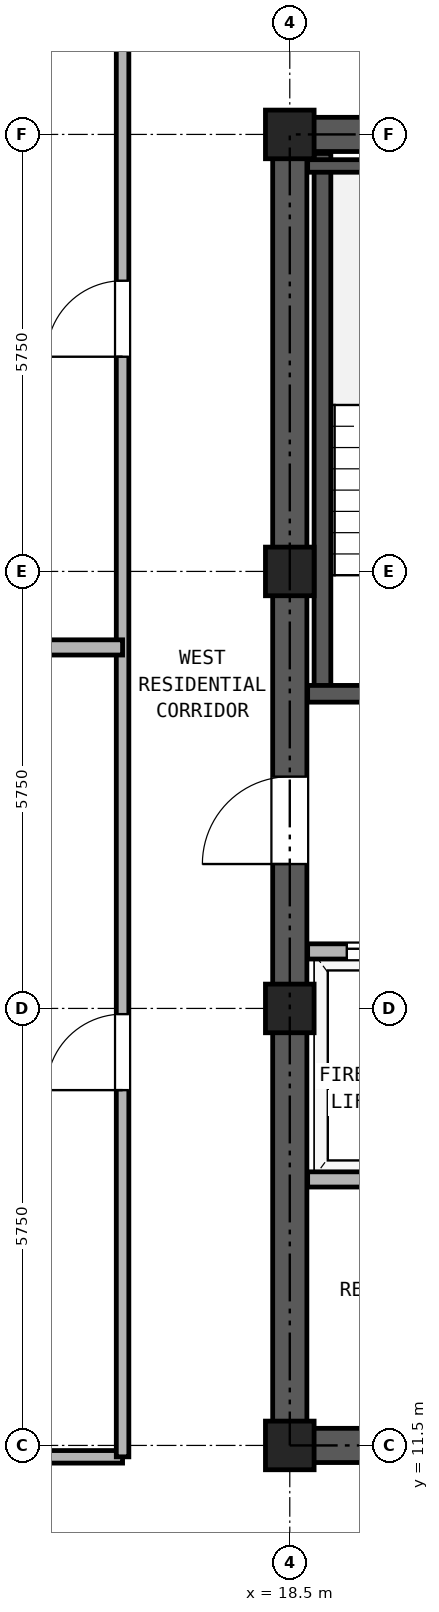
"""IFC4 building model, lengths in metres.
Left out: names, types, materials, properties, quantities, classifications, styles, units other than length and angle.
Written with IfcOpenShell. Run it as: python <this file> out.ifc"""

import sys

from ifc_helpers import new_model, si_unit, direction, frame, frame_2d, origin, origin_2d, place, context, subcontext, project, spatial, rectangle, hollow_rectangle, extrude, source, transform, mapped, element, fill, save


model = new_model("IFC4")
c1 = context("Model", 3, precision=1e-05, world=origin(), true_north=direction((0.0, 1.0)))
c2 = subcontext(c1, "Body", "Model", "MODEL_VIEW")
j1 = project(units=[si_unit("LENGTHUNIT", "METRE"), si_unit("PLANEANGLEUNIT", "RADIAN")], contexts=[c1])
p1 = place(None, origin())
s1 = spatial("IfcSite", under=j1, at=p1, CompositionType="ELEMENT")
p2 = place(p1, origin())
s2 = spatial("IfcBuilding", under=s1, at=p2, CompositionType="ELEMENT")
p3 = place(p2, frame((0.0, 0.0, 206.0)))
s3 = spatial("IfcBuildingStorey", under=s2, at=p3, CompositionType="ELEMENT", Elevation=206.0)
m1 = source(origin(), c2, "Body", "SweptSolid", [
    extrude(hollow_rectangle(XDim=0.64, YDim=0.64, WallThickness=0.035, at=origin_2d()), origin(), (0.0, 0.0, 1.0), 2.95),
])
for number, where, z_axis, x_axis in (
    (1, (18.5, 11.5, 0.0), (0.0, 0.0, 1.0), (1.0, 0.0, 0.0)),
    (2, (18.5, 17.25, 0.0), (0.0, 0.0, 1.0), (1.0, 0.0, 0.0)),
    (3, (18.5, 23.0, 0.0), (0.0, 0.0, 1.0), (1.0, 0.0, 0.0)),
    (4, (18.5, 28.75, 0.0), (0.0, 0.0, 1.0), (1.0, 0.0, 0.0)),
):
    element("IfcColumn", number, at=place(p3, frame(where, z_axis=z_axis, x_axis=x_axis)), inside=s3, PredefinedType="COLUMN", context=c2, shape_type="MappedRepresentation", body=[
        mapped(m1, transform((0.0, 0.0, 0.0), x_axis=(1.0, 0.0, 0.0), y_axis=(0.0, 1.0, 0.0), z_axis=(0.0, 0.0, 1.0), scale=1.0)),
    ])
p4 = place(p3, frame((18.275, 11.5, 0.0), z_axis=(0.0, 0.0, 1.0), x_axis=(1.0, 0.0, 0.0)))
e5 = element("IfcWall", 5, at=p4, inside=s3, PredefinedType="SHEAR", context=c2, shape_type="SweptSolid", body=[
    extrude(rectangle(XDim=10.45, YDim=0.45, at=frame_2d((5.225, 0.0))), origin(), (0.0, 0.0, 1.0), 2.95),
])
p5 = place(p4, frame((1.825, 0.0, 0.0)))
e6 = element("IfcOpeningElement", 6, at=p5, cuts=e5, PredefinedType="OPENING", context=c2, shape_type="SweptSolid", body=[
    extrude(rectangle(XDim=0.95, YDim=2.15, at=frame_2d((0.475, 1.075))), frame((0.0, 0.235, 0.0), z_axis=(0.0, -1.0, 0.0), x_axis=(1.0, 0.0, 0.0)), (0.0, 0.0, 1.0), 0.47),
])
p6 = place(p4, frame((5.325, 0.0, 0.0)))
e7 = element("IfcOpeningElement", 7, at=p6, cuts=e5, PredefinedType="OPENING", context=c2, shape_type="SweptSolid", body=[
    extrude(rectangle(XDim=0.95, YDim=2.15, at=frame_2d((0.475, 1.075))), frame((0.0, 0.235, 0.0), z_axis=(0.0, -1.0, 0.0), x_axis=(1.0, 0.0, 0.0)), (0.0, 0.0, 1.0), 0.47),
])
p7 = place(p4, frame((8.225, 0.0, 0.0)))
e8 = element("IfcOpeningElement", 8, at=p7, cuts=e5, PredefinedType="OPENING", context=c2, shape_type="SweptSolid", body=[
    extrude(rectangle(XDim=1.1, YDim=2.25, at=frame_2d((0.55, 1.125))), frame((0.0, 0.235, 0.0), z_axis=(0.0, -1.0, 0.0), x_axis=(1.0, 0.0, 0.0)), (0.0, 0.0, 1.0), 0.47),
])
p8 = place(p3, frame((18.275, 28.75, 0.0), z_axis=(0.0, 0.0, 1.0), x_axis=(1.0, 0.0, 0.0)))
e9 = element("IfcWall", 9, at=p8, inside=s3, PredefinedType="SHEAR", context=c2, shape_type="SweptSolid", body=[
    extrude(rectangle(XDim=10.45, YDim=0.45, at=frame_2d((5.225, 0.0))), origin(), (0.0, 0.0, 1.0), 2.95),
])
p9 = place(p8, frame((4.105, 0.0, 0.0)))
e10 = element("IfcOpeningElement", 10, at=p9, cuts=e9, PredefinedType="OPENING", context=c2, shape_type="SweptSolid", body=[
    extrude(rectangle(XDim=0.9, YDim=2.05, at=frame_2d((0.45, 1.025))), frame((0.0, 0.235, 0.0), z_axis=(0.0, -1.0, 0.0), x_axis=(1.0, 0.0, 0.0)), (0.0, 0.0, 1.0), 0.47),
])
p10 = place(p8, frame((5.645, 0.0, 0.0)))
e11 = element("IfcOpeningElement", 11, at=p10, cuts=e9, PredefinedType="OPENING", context=c2, shape_type="SweptSolid", body=[
    extrude(rectangle(XDim=0.9, YDim=2.05, at=frame_2d((0.45, 1.025))), frame((0.0, 0.235, 0.0), z_axis=(0.0, -1.0, 0.0), x_axis=(1.0, 0.0, 0.0)), (0.0, 0.0, 1.0), 0.47),
])
p11 = place(p3, frame((18.5, 11.725, 0.0), z_axis=(0.0, 0.0, 1.0), x_axis=(0.0, 1.0, 0.0)))
e12 = element("IfcWall", 12, at=p11, inside=s3, PredefinedType="SHEAR", context=c2, shape_type="SweptSolid", body=[
    extrude(rectangle(XDim=16.8, YDim=0.45, at=frame_2d((8.4, 0.0))), origin(), (0.0, 0.0, 1.0), 2.95),
])
p12 = place(p11, frame((7.425, 0.0, 0.0)))
e13 = element("IfcOpeningElement", 13, at=p12, cuts=e12, PredefinedType="OPENING", context=c2, shape_type="SweptSolid", body=[
    extrude(rectangle(XDim=1.15, YDim=2.2, at=frame_2d((0.575, 1.1))), frame((0.0, 0.235, 0.0), z_axis=(0.0, -1.0, 0.0), x_axis=(1.0, 0.0, 0.0)), (0.0, 0.0, 1.0), 0.47),
])
p13 = place(p3, frame((18.93, 21.39, 0.0), z_axis=(0.0, 0.0, 1.0), x_axis=(0.0, 1.0, 0.0)))
e14 = element("IfcWall", 14, at=p13, inside=s3, PredefinedType="SOLIDWALL", context=c2, shape_type="SweptSolid", body=[
    extrude(rectangle(XDim=7.11, YDim=0.22, at=frame_2d((3.555, 0.0))), origin(), (0.0, 0.0, 1.0), 2.95),
])
p14 = place(p3, frame((18.735, 28.335, 0.0), z_axis=(0.0, 0.0, 1.0), x_axis=(1.0, 0.0, 0.0)))
e15 = element("IfcWall", 15, at=p14, inside=s3, PredefinedType="PARTITIONING", context=c2, shape_type="SweptSolid", body=[
    extrude(rectangle(XDim=3.375, YDim=0.165, at=frame_2d((1.688, 0.0))), origin(), (0.0, 0.0, 1.0), 2.95),
])
p15 = place(p3, frame((18.735, 21.39, 0.0), z_axis=(0.0, 0.0, 1.0), x_axis=(1.0, 0.0, 0.0)))
e16 = element("IfcWall", 16, at=p15, inside=s3, PredefinedType="SOLIDWALL", context=c2, shape_type="SweptSolid", body=[
    extrude(rectangle(XDim=6.395, YDim=0.22, at=frame_2d((3.197, 0.0))), origin(), (0.0, 0.0, 1.0), 2.95),
])
p16 = place(p15, frame((1.115, 0.0, 0.0)))
e17 = element("IfcOpeningElement", 17, at=p16, cuts=e16, PredefinedType="OPENING", context=c2, shape_type="SweptSolid", body=[
    extrude(rectangle(XDim=1.15, YDim=2.2, at=frame_2d((0.575, 1.1))), frame((0.0, 0.12, 0.0), z_axis=(0.0, -1.0, 0.0), x_axis=(1.0, 0.0, 0.0)), (0.0, 0.0, 1.0), 0.24),
])
p17 = place(p15, frame((4.845, 0.0, 0.0)))
e18 = element("IfcOpeningElement", 18, at=p17, cuts=e16, PredefinedType="OPENING", context=c2, shape_type="SweptSolid", body=[
    extrude(rectangle(XDim=1.1, YDim=2.25, at=frame_2d((0.55, 1.125))), frame((0.0, 0.12, 0.0), z_axis=(0.0, -1.0, 0.0), x_axis=(1.0, 0.0, 0.0)), (0.0, 0.0, 1.0), 0.24),
])
p18 = place(p3, frame((18.735, 18.0, 0.0), z_axis=(0.0, 0.0, 1.0), x_axis=(1.0, 0.0, 0.0)))
e19 = element("IfcWall", 19, at=p18, inside=s3, PredefinedType="PARTITIONING", context=c2, shape_type="SweptSolid", body=[
    extrude(rectangle(XDim=9.53, YDim=0.2, at=frame_2d((4.765, 0.0))), origin(), (0.0, 0.0, 1.0), 2.95),
])
p19 = place(p18, frame((0.515, 0.0, 0.0)))
e20 = element("IfcOpeningElement", 20, at=p19, cuts=e19, PredefinedType="OPENING", context=c2, shape_type="SweptSolid", body=[
    extrude(rectangle(XDim=1.3, YDim=2.3, at=frame_2d((0.65, 1.15))), frame((0.0, 0.11, 0.0), z_axis=(0.0, -1.0, 0.0), x_axis=(1.0, 0.0, 0.0)), (0.0, 0.0, 1.0), 0.22),
])
p20 = place(p18, frame((2.615, 0.0, 0.0)))
e21 = element("IfcOpeningElement", 21, at=p20, cuts=e19, PredefinedType="OPENING", context=c2, shape_type="SweptSolid", body=[
    extrude(rectangle(XDim=1.3, YDim=2.3, at=frame_2d((0.65, 1.15))), frame((0.0, 0.11, 0.0), z_axis=(0.0, -1.0, 0.0), x_axis=(1.0, 0.0, 0.0)), (0.0, 0.0, 1.0), 0.22),
])
p21 = place(p18, frame((5.015, 0.0, 0.0)))
e22 = element("IfcOpeningElement", 22, at=p21, cuts=e19, PredefinedType="OPENING", context=c2, shape_type="SweptSolid", body=[
    extrude(rectangle(XDim=0.9, YDim=2.05, at=frame_2d((0.45, 1.025))), frame((0.0, 0.11, 0.0), z_axis=(0.0, -1.0, 0.0), x_axis=(1.0, 0.0, 0.0)), (0.0, 0.0, 1.0), 0.22),
])
p22 = place(p18, frame((7.715, 0.0, 0.0)))
e23 = element("IfcOpeningElement", 23, at=p22, cuts=e19, PredefinedType="OPENING", context=c2, shape_type="SweptSolid", body=[
    extrude(rectangle(XDim=0.9, YDim=2.05, at=frame_2d((0.45, 1.025))), frame((0.0, 0.11, 0.0), z_axis=(0.0, -1.0, 0.0), x_axis=(1.0, 0.0, 0.0)), (0.0, 0.0, 1.0), 0.22),
])
p23 = place(p3, frame((18.735, 15.0, 0.0), z_axis=(0.0, 0.0, 1.0), x_axis=(1.0, 0.0, 0.0)))
e24 = element("IfcWall", 24, at=p23, inside=s3, PredefinedType="PARTITIONING", context=c2, shape_type="SweptSolid", body=[
    extrude(rectangle(XDim=9.53, YDim=0.2, at=frame_2d((4.765, 0.0))), origin(), (0.0, 0.0, 1.0), 2.95),
])
p24 = place(p3, frame((7.6, 11.35, 0.0), z_axis=(0.0, 0.0, 1.0), x_axis=(1.0, 0.0, 0.0)))
e25 = element("IfcWall", 25, at=p24, inside=s3, PredefinedType="PARTITIONING", context=c2, shape_type="SweptSolid", body=[
    extrude(rectangle(XDim=8.7, YDim=0.165, at=frame_2d((4.35, 0.0))), origin(), (0.0, 0.0, 1.0), 2.323),
])
p25 = place(p3, frame((16.3, 11.35, 0.0), z_axis=(0.0, 0.0, 1.0), x_axis=(0.0, 1.0, 0.0)))
e26 = element("IfcWall", 26, at=p25, inside=s3, PredefinedType="PARTITIONING", context=c2, shape_type="SweptSolid", body=[
    extrude(rectangle(XDim=23.79, YDim=0.165, at=frame_2d((11.895, 0.0))), origin(), (0.0, 0.0, 1.0), 2.95),
])
p26 = place(p25, frame((4.825, 0.0, 0.0)))
e27 = element("IfcOpeningElement", 27, at=p26, cuts=e26, PredefinedType="OPENING", context=c2, shape_type="SweptSolid", body=[
    extrude(rectangle(XDim=1.0, YDim=2.15, at=frame_2d((0.5, 1.075))), frame((0.0, 0.093, 0.0), z_axis=(0.0, -1.0, 0.0), x_axis=(1.0, 0.0, 0.0)), (0.0, 0.0, 1.0), 0.185),
])
p27 = place(p25, frame((14.475, 0.0, 0.0)))
e28 = element("IfcOpeningElement", 28, at=p27, cuts=e26, PredefinedType="OPENING", context=c2, shape_type="SweptSolid", body=[
    extrude(rectangle(XDim=1.0, YDim=2.15, at=frame_2d((0.5, 1.075))), frame((0.0, 0.093, 0.0), z_axis=(0.0, -1.0, 0.0), x_axis=(1.0, 0.0, 0.0)), (0.0, 0.0, 1.0), 0.185),
])
p28 = place(p3, frame((0.16, 22.0, 0.0), z_axis=(0.0, 0.0, 1.0), x_axis=(1.0, 0.0, 0.0)))
e29 = element("IfcWall", 29, at=p28, inside=s3, PredefinedType="PARTITIONING", context=c2, shape_type="SweptSolid", body=[
    extrude(rectangle(XDim=16.14, YDim=0.2, at=frame_2d((8.07, 0.0))), origin(), (0.0, 0.0, 1.0), 2.95),
])
p29 = place(p19, origin())
e30 = element("IfcDoor", 30, at=p29, inside=s3, OperationType="DOUBLE_DOOR_SLIDING", PredefinedType="DOOR", context=c2, shape_type="SweptSolid", body=[
    extrude(rectangle(XDim=1.3, YDim=2.3, at=frame_2d((0.65, 1.15))), frame((0.0, 0.025, 0.0), z_axis=(0.0, -1.0, 0.0), x_axis=(1.0, 0.0, 0.0)), (0.0, 0.0, 1.0), 0.05),
])
fill(e20, e30)
p30 = place(p12, frame((1.15, 0.0, 0.0), z_axis=(0.0, 0.0, 1.0), x_axis=(-1.0, 0.0, 0.0)))
e31 = element("IfcDoor", 31, at=p30, inside=s3, OperationType="SINGLE_SWING_LEFT", PredefinedType="DOOR", context=c2, shape_type="SweptSolid", body=[
    extrude(rectangle(XDim=1.15, YDim=2.2, at=frame_2d((0.575, 1.1))), frame((0.0, 0.025, 0.0), z_axis=(0.0, -1.0, 0.0), x_axis=(1.0, 0.0, 0.0)), (0.0, 0.0, 1.0), 0.05),
])
fill(e13, e31)
p31 = place(p26, origin())
e32 = element("IfcDoor", 32, at=p31, inside=s3, OperationType="SINGLE_SWING_LEFT", PredefinedType="DOOR", context=c2, shape_type="SweptSolid", body=[
    extrude(rectangle(XDim=1.0, YDim=2.15, at=frame_2d((0.5, 1.075))), frame((0.0, 0.025, 0.0), z_axis=(0.0, -1.0, 0.0), x_axis=(1.0, 0.0, 0.0)), (0.0, 0.0, 1.0), 0.05),
])
fill(e27, e32)
p32 = place(p27, origin())
e33 = element("IfcDoor", 33, at=p32, inside=s3, OperationType="SINGLE_SWING_LEFT", PredefinedType="DOOR", context=c2, shape_type="SweptSolid", body=[
    extrude(rectangle(XDim=1.0, YDim=2.15, at=frame_2d((0.5, 1.075))), frame((0.0, 0.025, 0.0), z_axis=(0.0, -1.0, 0.0), x_axis=(1.0, 0.0, 0.0)), (0.0, 0.0, 1.0), 0.05),
])
fill(e28, e33)
save(model, sys.argv[1])
